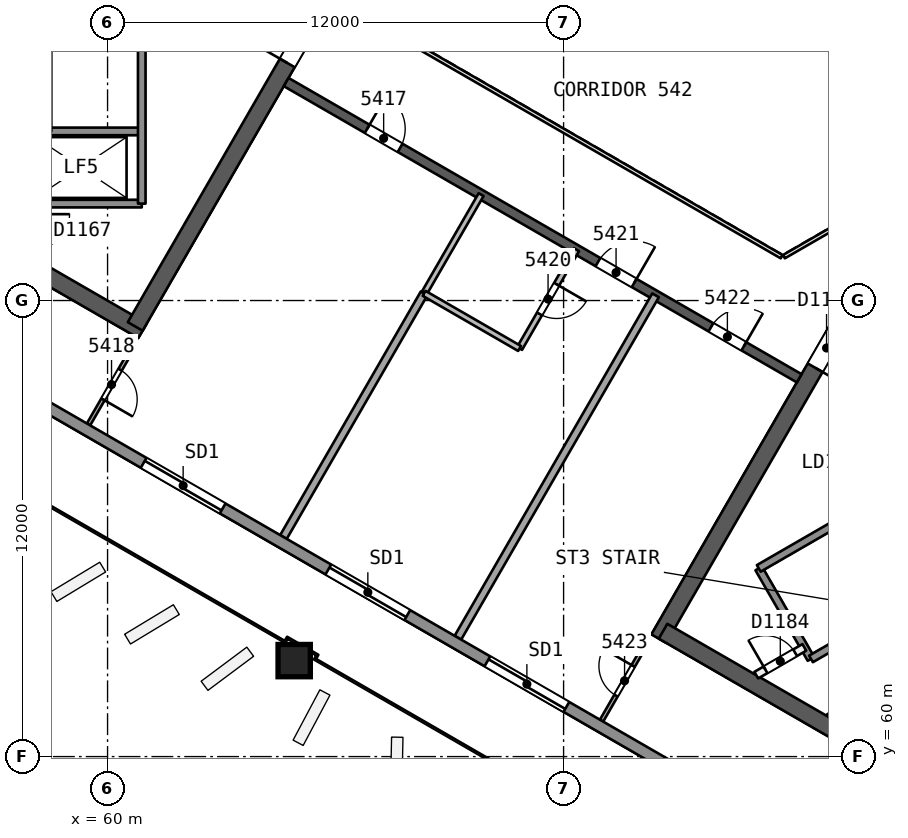
"""IFC4 building model, lengths in metres.
Left out: names, types, materials, properties, quantities, classifications, styles, units other than length and angle.
Written with IfcOpenShell. Run it as: python <this file> out.ifc"""

import sys

from ifc_helpers import new_model, si_unit, direction, frame, frame_2d, origin, origin_2d, place, context, subcontext, project, spatial, rectangle, extrude, element, fill, save


model = new_model("IFC4")
c1 = context("Model", 3, precision=1e-05, world=origin(), true_north=direction((0.0, 1.0)))
c2 = subcontext(c1, "Body", "Model", "MODEL_VIEW")
j1 = project(units=[si_unit("LENGTHUNIT", "METRE"), si_unit("PLANEANGLEUNIT", "RADIAN")], contexts=[c1])
p1 = place(None, origin())
s1 = spatial("IfcSite", under=j1, at=p1, CompositionType="ELEMENT")
p2 = place(p1, origin())
s2 = spatial("IfcBuilding", under=s1, at=p2, CompositionType="ELEMENT")
p3 = place(p2, frame((0.0, 0.0, 220.6)))
s3 = spatial("IfcBuildingStorey", under=s2, at=p3, CompositionType="ELEMENT", Elevation=220.6)
p4 = place(p3, frame((48.622, 78.307, 0.0), z_axis=(0.0, 0.0, 1.0), x_axis=(0.86602701116, -0.499997215934, 0.0)))
e1 = element("IfcWall", 1, at=p4, inside=s3, PredefinedType="SHEAR", context=c2, shape_type="SweptSolid", body=[
    extrude(rectangle(XDim=14.204, YDim=0.45, at=frame_2d((7.102, 0.0))), origin(), (0.0, 0.0, 1.0), 3.7),
])
p5 = place(p3, frame((60.728, 71.318, 0.0), z_axis=(0.0, 0.0, 1.0), x_axis=(0.500012416173, 0.866018235185, 0.0)))
e2 = element("IfcWall", 2, at=p5, inside=s3, PredefinedType="SHEAR", context=c2, shape_type="SweptSolid", body=[
    extrude(rectangle(XDim=10.155, YDim=0.45, at=frame_2d((5.078, 0.0))), origin(), (0.0, 0.0, 1.0), 3.7),
])
p6 = place(p5, frame((8.005, 0.0, 0.0)))
e3 = element("IfcOpeningElement", 3, at=p6, cuts=e2, PredefinedType="OPENING", context=c2, shape_type="SweptSolid", body=[
    extrude(rectangle(XDim=1.2, YDim=2.1, at=frame_2d((0.6, 1.05))), frame((0.0, 0.235, 0.0), z_axis=(0.0, -1.0, 0.0), x_axis=(1.0, 0.0, 0.0)), (0.0, 0.0, 1.0), 0.471),
])
p7 = place(p3, frame((79.63, 71.981, 0.0), z_axis=(0.0, 0.0, 1.0), x_axis=(-0.500002171595, -0.86602415001, 0.0)))
e4 = element("IfcWall", 4, at=p7, inside=s3, PredefinedType="SHEAR", context=c2, shape_type="SweptSolid", body=[
    extrude(rectangle(XDim=10.25, YDim=0.45, at=frame_2d((5.125, 0.0))), origin(), (0.0, 0.0, 1.0), 3.7),
])
p8 = place(p7, frame((0.82, 0.0, 0.0)))
e5 = element("IfcOpeningElement", 5, at=p8, cuts=e4, PredefinedType="OPENING", context=c2, shape_type="SweptSolid", body=[
    extrude(rectangle(XDim=1.2, YDim=2.1, at=frame_2d((0.6, 1.05))), frame((0.0, 0.235, 0.0), z_axis=(0.0, -1.0, 0.0), x_axis=(1.0, 0.0, 0.0)), (0.0, 0.0, 1.0), 0.471),
])
p9 = place(p3, frame((74.617, 63.299, 0.0), z_axis=(0.0, 0.0, 1.0), x_axis=(0.86602594008, -0.499999071108, 0.0)))
e6 = element("IfcWall", 6, at=p9, inside=s3, PredefinedType="SHEAR", context=c2, shape_type="SweptSolid", body=[
    extrude(rectangle(XDim=14.108, YDim=0.45, at=frame_2d((7.054, 0.0))), origin(), (0.0, 0.0, 1.0), 3.7),
])
p10 = place(p3, frame((64.7, 77.748, 0.0), z_axis=(0.0, 0.0, 1.0), x_axis=(0.866026492143, -0.499998114903, 0.0)))
e7 = element("IfcWall", 7, at=p10, inside=s3, PredefinedType="SHEAR", context=c2, shape_type="SweptSolid", body=[
    extrude(rectangle(XDim=15.588, YDim=0.25, at=frame_2d((7.794, 0.0))), origin(), (0.0, 0.0, 1.0), 3.3),
])
p11 = place(p10, frame((2.462, 0.0, 0.0)))
e8 = element("IfcOpeningElement", 8, at=p11, cuts=e7, PredefinedType="OPENING", context=c2, shape_type="SweptSolid", body=[
    extrude(rectangle(XDim=1.0, YDim=2.1, at=frame_2d((0.5, 1.05))), frame((0.0, 0.135, 0.0), z_axis=(0.0, -1.0, 0.0), x_axis=(1.0, 0.0, 0.0)), (0.0, 0.0, 1.0), 0.271),
])
p12 = place(p10, frame((9.474, 0.0, 0.0)))
e9 = element("IfcOpeningElement", 9, at=p12, cuts=e7, PredefinedType="OPENING", context=c2, shape_type="SweptSolid", body=[
    extrude(rectangle(XDim=1.1, YDim=2.1, at=frame_2d((0.55, 1.05))), frame((0.0, 0.135, 0.0), z_axis=(0.0, -1.0, 0.0), x_axis=(1.0, 0.0, 0.0)), (0.0, 0.0, 1.0), 0.271),
])
p13 = place(p10, frame((12.906, 0.0, 0.0)))
e10 = element("IfcOpeningElement", 10, at=p13, cuts=e7, PredefinedType="OPENING", context=c2, shape_type="SweptSolid", body=[
    extrude(rectangle(XDim=1.0, YDim=2.1, at=frame_2d((0.5, 1.05))), frame((0.0, 0.135, 0.0), z_axis=(0.0, -1.0, 0.0), x_axis=(1.0, 0.0, 0.0)), (0.0, 0.0, 1.0), 0.271),
])
p14 = place(p3, frame((64.899, 62.505, 0.0), z_axis=(0.010093620709, 0.017482414954, 0.999796221231), x_axis=(-0.866025993948, 0.499998977805, 1.48331e-07)))
e11 = element("IfcColumn", 11, at=p14, inside=s3, PredefinedType="COLUMN", context=c2, shape_type="SweptSolid", body=[
    extrude(rectangle(XDim=0.85, YDim=0.85, at=origin_2d()), origin(), (0.0, 0.0, 1.0), 3.701),
])
p15 = place(p3, frame((60.71, 70.838, 0.0), z_axis=(0.0, 0.0, 1.0), x_axis=(-0.49995203611, -0.866053093978, 0.0)))
e12 = element("IfcWall", 12, at=p15, inside=s3, PredefinedType="PARTITIONING", context=c2, shape_type="SweptSolid", body=[
    extrude(rectangle(XDim=2.424, YDim=0.1, at=frame_2d((1.212, 0.0))), origin(), (0.0, 0.0, 1.0), 3.3),
])
p16 = place(p15, frame((0.762, 0.0, 0.0)))
e13 = element("IfcOpeningElement", 13, at=p16, cuts=e12, PredefinedType="OPENING", context=c2, shape_type="SweptSolid", body=[
    extrude(rectangle(XDim=0.9, YDim=2.1, at=frame_2d((0.45, 1.05))), frame((0.0, 0.061, 0.0), z_axis=(0.0, -1.0, 0.0), x_axis=(1.0, 0.0, 0.0)), (0.0, 0.0, 1.0), 0.121),
])
p17 = place(p3, frame((64.628, 65.777, 0.0), z_axis=(0.0, 0.0, 1.0), x_axis=(0.500019340035, 0.866014237522, 0.0)))
e14 = element("IfcWall", 14, at=p17, inside=s3, PredefinedType="PARTITIONING", context=c2, shape_type="SweptSolid", body=[
    extrude(rectangle(XDim=7.403, YDim=0.2, at=frame_2d((3.702, 0.0))), origin(), (0.0, 0.0, 1.0), 3.3),
])
p18 = place(p3, frame((68.33, 72.188, 0.0), z_axis=(0.0, 0.0, 1.0), x_axis=(0.499990139034, 0.866031096941, 0.0)))
e15 = element("IfcWall", 15, at=p18, inside=s3, PredefinedType="PARTITIONING", context=c2, shape_type="SweptSolid", body=[
    extrude(rectangle(XDim=3.0, YDim=0.15, at=frame_2d((1.5, 0.0))), origin(), (0.0, 0.0, 1.0), 3.3),
])
p19 = place(p3, frame((72.342, 73.336, 0.0), z_axis=(0.0, 0.0, 1.0), x_axis=(-0.50002537861, -0.866010750942, 0.0)))
e16 = element("IfcWall", 16, at=p19, inside=s3, PredefinedType="PARTITIONING", context=c2, shape_type="SweptSolid", body=[
    extrude(rectangle(XDim=3.0, YDim=0.15, at=frame_2d((1.5, 0.0))), origin(), (0.0, 0.0, 1.0), 3.3),
])
p20 = place(p19, frame((1.05, 0.0, 0.0)))
e17 = element("IfcOpeningElement", 17, at=p20, cuts=e16, PredefinedType="OPENING", context=c2, shape_type="SweptSolid", body=[
    extrude(rectangle(XDim=0.9, YDim=2.1, at=frame_2d((0.45, 1.05))), frame((0.0, 0.085, 0.0), z_axis=(0.0, -1.0, 0.0), x_axis=(1.0, 0.0, 0.0)), (0.0, 0.0, 1.0), 0.171),
])
p21 = place(p3, frame((70.842, 70.739, 0.0), z_axis=(0.0, 0.0, 1.0), x_axis=(-0.866032775405, 0.499987231761, 0.0)))
e18 = element("IfcWall", 18, at=p21, inside=s3, PredefinedType="PARTITIONING", context=c2, shape_type="SweptSolid", body=[
    extrude(rectangle(XDim=2.9, YDim=0.15, at=frame_2d((1.45, 0.0))), origin(), (0.0, 0.0, 1.0), 3.3),
])
p22 = place(p3, frame((69.219, 63.127, 0.0), z_axis=(0.0, 0.0, 1.0), x_axis=(0.499993317952, 0.866029261632, 0.0)))
e19 = element("IfcWall", 19, at=p22, inside=s3, PredefinedType="PARTITIONING", context=c2, shape_type="SweptSolid", body=[
    extrude(rectangle(XDim=10.403, YDim=0.2, at=frame_2d((5.202, 0.0))), origin(), (0.0, 0.0, 1.0), 3.3),
])
p23 = place(p3, frame((72.999, 60.945, 0.0), z_axis=(0.0, 0.0, 1.0), x_axis=(0.49995203611, 0.866053093978, 0.0)))
e20 = element("IfcWall", 20, at=p23, inside=s3, PredefinedType="PARTITIONING", context=c2, shape_type="SweptSolid", body=[
    extrude(rectangle(XDim=2.424, YDim=0.1, at=frame_2d((1.212, 0.0))), origin(), (0.0, 0.0, 1.0), 3.3),
])
p24 = place(p23, frame((0.762, 0.0, 0.0)))
e21 = element("IfcOpeningElement", 21, at=p24, cuts=e20, PredefinedType="OPENING", context=c2, shape_type="SweptSolid", body=[
    extrude(rectangle(XDim=0.9, YDim=2.1, at=frame_2d((0.45, 1.05))), frame((0.0, 0.061, 0.0), z_axis=(0.0, -1.0, 0.0), x_axis=(1.0, 0.0, 0.0)), (0.0, 0.0, 1.0), 0.121),
])
p25 = place(p3, frame((88.155, 52.022, 0.0), z_axis=(0.0, 0.0, 1.0), x_axis=(-0.866024521231, 0.500001528624, 0.0)))
e22 = element("IfcWall", 22, at=p25, inside=s3, PredefinedType="SOLIDWALL", context=c2, shape_type="SweptSolid", body=[
    extrude(rectangle(XDim=50.762, YDim=0.3, at=frame_2d((25.381, 0.0))), origin(), (0.0, 0.0, 1.0), 3.3),
])
p26 = place(p25, frame((23.402, 0.0, 0.0)))
e23 = element("IfcOpeningElement", 23, at=p26, cuts=e22, PredefinedType="OPENING", context=c2, shape_type="SweptSolid", body=[
    extrude(rectangle(XDim=2.4, YDim=2.4, at=frame_2d((1.2, 1.2))), frame((0.0, 0.161, 0.0), z_axis=(0.0, -1.0, 0.0), x_axis=(1.0, 0.0, 0.0)), (0.0, 0.0, 1.0), 0.321),
])
p27 = place(p25, frame((29.013, 0.0, 0.0)))
e24 = element("IfcOpeningElement", 24, at=p27, cuts=e22, PredefinedType="OPENING", context=c2, shape_type="SweptSolid", body=[
    extrude(rectangle(XDim=2.4, YDim=2.4, at=frame_2d((1.2, 1.2))), frame((0.0, 0.161, 0.0), z_axis=(0.0, -1.0, 0.0), x_axis=(1.0, 0.0, 0.0)), (0.0, 0.0, 1.0), 0.321),
])
p28 = place(p25, frame((39.492, 0.0, 0.0)))
e25 = element("IfcOpeningElement", 25, at=p28, cuts=e22, PredefinedType="OPENING", context=c2, shape_type="SweptSolid", body=[
    extrude(rectangle(XDim=2.4, YDim=2.4, at=frame_2d((1.2, 1.2))), frame((0.0, 0.161, 0.0), z_axis=(0.0, -1.0, 0.0), x_axis=(1.0, 0.0, 0.0)), (0.0, 0.0, 1.0), 0.321),
])
p29 = place(p25, frame((18.569, 0.0, 0.0)))
e26 = element("IfcOpeningElement", 26, at=p29, cuts=e22, PredefinedType="OPENING", context=c2, shape_type="SweptSolid", body=[
    extrude(rectangle(XDim=2.4, YDim=2.4, at=frame_2d((1.2, 1.2))), frame((0.0, 0.161, 0.0), z_axis=(0.0, -1.0, 0.0), x_axis=(1.0, 0.0, 0.0)), (0.0, 0.0, 1.0), 0.321),
])
p30 = place(p25, frame((8.878, 0.0, 0.0)))
e27 = element("IfcOpeningElement", 27, at=p30, cuts=e22, PredefinedType="OPENING", context=c2, shape_type="SweptSolid", body=[
    extrude(rectangle(XDim=2.4, YDim=2.4, at=frame_2d((1.2, 1.2))), frame((0.0, 0.161, 0.0), z_axis=(0.0, -1.0, 0.0), x_axis=(1.0, 0.0, 0.0)), (0.0, 0.0, 1.0), 0.321),
])
for number, where, z_axis, x_axis in (
    (28, (60.9, 76.45, 0.0), (0.0, 0.0, 1.0), (-1.0, 0.0, 0.0)),
    (29, (60.9, 74.55, 0.0), (0.0, 0.0, 1.0), (-1.0, 0.0, 0.0)),
):
    element("IfcWall", number, at=place(p3, frame(where, z_axis=z_axis, x_axis=x_axis)), inside=s3, PredefinedType="SOLIDWALL", context=c2, shape_type="SweptSolid", body=[
        extrude(rectangle(XDim=3.05, YDim=0.2, at=frame_2d((1.525, 0.0))), origin(), (0.0, 0.0, 1.0), 3.3),
    ])
p31 = place(p3, frame((60.9, 85.45, 0.0), z_axis=(0.0, 0.0, 1.0), x_axis=(0.0, -1.0, 0.0)))
e30 = element("IfcWall", 30, at=p31, inside=s3, PredefinedType="SOLIDWALL", context=c2, shape_type="SweptSolid", body=[
    extrude(rectangle(XDim=10.9, YDim=0.2, at=frame_2d((5.45, 0.0))), origin(), (0.0, 0.0, 1.0), 3.3),
])
p32 = place(p31, frame((4.0, 0.0, 0.0)))
e31 = element("IfcOpeningElement", 31, at=p32, cuts=e30, PredefinedType="OPENING", context=c2, shape_type="SweptSolid", body=[
    extrude(rectangle(XDim=1.0, YDim=2.1, at=frame_2d((0.5, 1.05))), frame((0.0, 0.11, 0.0), z_axis=(0.0, -1.0, 0.0), x_axis=(1.0, 0.0, 0.0)), (0.0, 0.0, 1.0), 0.221),
])
p33 = place(p3, frame((77.135, 64.952, 0.0), z_axis=(0.0, 0.0, 1.0), x_axis=(0.499996545922, -0.866027397988, 0.0)))
e32 = element("IfcWall", 32, at=p33, inside=s3, PredefinedType="SOLIDWALL", context=c2, shape_type="SweptSolid", body=[
    extrude(rectangle(XDim=2.75, YDim=0.2, at=frame_2d((1.375, 0.0))), origin(), (0.0, 0.0, 1.0), 3.3),
])
p34 = place(p3, frame((77.135, 64.952, 0.0), z_axis=(0.0, 0.0, 1.0), x_axis=(0.866031916153, 0.499988720078, 0.0)))
e33 = element("IfcWall", 33, at=p34, inside=s3, PredefinedType="SOLIDWALL", context=c2, shape_type="SweptSolid", body=[
    extrude(rectangle(XDim=11.35, YDim=0.2, at=frame_2d((5.675, 0.0))), origin(), (0.0, 0.0, 1.0), 3.3),
])
p35 = place(p34, frame((2.875, 0.0, 0.0)))
e34 = element("IfcOpeningElement", 34, at=p35, cuts=e33, PredefinedType="OPENING", context=c2, shape_type="SweptSolid", body=[
    extrude(rectangle(XDim=1.1, YDim=2.1, at=frame_2d((0.55, 1.05))), frame((0.0, 0.11, 0.0), z_axis=(0.0, -1.0, 0.0), x_axis=(1.0, 0.0, 0.0)), (0.0, 0.0, 1.0), 0.221),
])
p36 = place(p34, frame((5.125, 0.0, 0.0)))
e35 = element("IfcOpeningElement", 35, at=p36, cuts=e33, PredefinedType="OPENING", context=c2, shape_type="SweptSolid", body=[
    extrude(rectangle(XDim=1.1, YDim=2.1, at=frame_2d((0.55, 1.05))), frame((0.0, 0.11, 0.0), z_axis=(0.0, -1.0, 0.0), x_axis=(1.0, 0.0, 0.0)), (0.0, 0.0, 1.0), 0.221),
])
p37 = place(p34, frame((7.375, 0.0, 0.0)))
e36 = element("IfcOpeningElement", 36, at=p37, cuts=e33, PredefinedType="OPENING", context=c2, shape_type="SweptSolid", body=[
    extrude(rectangle(XDim=1.1, YDim=2.1, at=frame_2d((0.55, 1.05))), frame((0.0, 0.11, 0.0), z_axis=(0.0, -1.0, 0.0), x_axis=(1.0, 0.0, 0.0)), (0.0, 0.0, 1.0), 0.221),
])
p38 = place(p3, frame((77.07, 62.143, 0.0), z_axis=(0.0, 0.0, 1.0), x_axis=(0.866013036001, 0.500021421018, 0.0)))
e37 = element("IfcWall", 37, at=p38, inside=s3, PredefinedType="PARTITIONING", context=c2, shape_type="SweptSolid", body=[
    extrude(rectangle(XDim=1.461, YDim=0.2, at=frame_2d((0.73, 0.0))), origin(), (0.0, 0.0, 1.0), 3.3),
])
p39 = place(p38, frame((0.281, 0.0, 0.0)))
e38 = element("IfcOpeningElement", 38, at=p39, cuts=e37, PredefinedType="OPENING", context=c2, shape_type="SweptSolid", body=[
    extrude(rectangle(XDim=0.9, YDim=2.1, at=frame_2d((0.45, 1.05))), frame((0.0, 0.11, 0.0), z_axis=(0.0, -1.0, 0.0), x_axis=(1.0, 0.0, 0.0)), (0.0, 0.0, 1.0), 0.221),
])
p40 = place(p3, frame((78.51, 62.57, 0.0), z_axis=(0.0, 0.0, 1.0), x_axis=(0.866053019151, 0.499952165731, 0.0)))
e39 = element("IfcWall", 39, at=p40, inside=s3, PredefinedType="SOLIDWALL", context=c2, shape_type="SweptSolid", body=[
    extrude(rectangle(XDim=2.3, YDim=0.2, at=frame_2d((1.15, 0.0))), origin(), (0.0, 0.0, 1.0), 3.3),
])
p41 = place(p3, frame((78.97, 61.046, 0.0), z_axis=(0.0, 0.0, 1.0), x_axis=(0.866033475577, 0.499986018985, 0.0)))
e40 = element("IfcWall", 40, at=p41, inside=s3, PredefinedType="PARTITIONING", context=c2, shape_type="SweptSolid", body=[
    extrude(rectangle(XDim=2.539, YDim=0.15, at=frame_2d((1.27, 0.0))), origin(), (0.0, 0.0, 1.0), 3.3),
])
p42 = place(p3, frame((67.702, 78.948, 0.0), z_axis=(0.0, 0.0, 1.0), x_axis=(0.866026658274, -0.499997827154, 0.0)))
e41 = element("IfcWall", 41, at=p42, inside=s3, PredefinedType="PARTITIONING", context=c2, shape_type="SweptSolid", body=[
    extrude(rectangle(XDim=11.588, YDim=0.1, at=frame_2d((5.794, 0.0))), origin(), (0.0, 0.0, 1.0), 3.3),
])
p43 = place(p3, frame((77.798, 73.154, 0.0), z_axis=(0.0, 0.0, 1.0), x_axis=(0.866041268327, 0.499972520799, 0.0)))
e42 = element("IfcWall", 42, at=p43, inside=s3, PredefinedType="PARTITIONING", context=c2, shape_type="SweptSolid", body=[
    extrude(rectangle(XDim=2.0, YDim=0.1, at=frame_2d((1.0, 0.0))), origin(), (0.0, 0.0, 1.0), 3.3),
])
p44 = place(p11, origin())
e43 = element("IfcDoor", 43, at=p44, inside=s3, OperationType="SINGLE_SWING_LEFT", PredefinedType="NOTDEFINED", context=c2, shape_type="SweptSolid", body=[
    extrude(rectangle(XDim=1.0, YDim=2.1, at=frame_2d((0.5, 1.05))), frame((0.0, 0.025, 0.0), z_axis=(0.0, -1.0, 0.0), x_axis=(1.0, 0.0, 0.0)), (0.0, 0.0, 1.0), 0.05),
])
fill(e8, e43)
p45 = place(p16, origin())
e44 = element("IfcDoor", 44, at=p45, inside=s3, OperationType="SINGLE_SWING_RIGHT", PredefinedType="NOTDEFINED", context=c2, shape_type="SweptSolid", body=[
    extrude(rectangle(XDim=0.9, YDim=2.1, at=frame_2d((0.45, 1.05))), frame((0.0, 0.025, 0.0), z_axis=(0.0, -1.0, 0.0), x_axis=(1.0, 0.0, 0.0)), (0.0, 0.0, 1.0), 0.05),
])
fill(e13, e44)
p46 = place(p20, origin())
e45 = element("IfcDoor", 45, at=p46, inside=s3, OperationType="SINGLE_SWING_LEFT", PredefinedType="NOTDEFINED", context=c2, shape_type="SweptSolid", body=[
    extrude(rectangle(XDim=0.9, YDim=2.1, at=frame_2d((0.45, 1.05))), frame((0.0, 0.025, 0.0), z_axis=(0.0, -1.0, 0.0), x_axis=(1.0, 0.0, 0.0)), (0.0, 0.0, 1.0), 0.05),
])
fill(e17, e45)
p47 = place(p12, origin())
e46 = element("IfcDoor", 46, at=p47, inside=s3, OperationType="SINGLE_SWING_RIGHT", PredefinedType="NOTDEFINED", context=c2, shape_type="SweptSolid", body=[
    extrude(rectangle(XDim=1.1, YDim=2.1, at=frame_2d((0.55, 1.05))), frame((0.0, 0.025, 0.0), z_axis=(0.0, -1.0, 0.0), x_axis=(1.0, 0.0, 0.0)), (0.0, 0.0, 1.0), 0.05),
])
fill(e9, e46)
p48 = place(p13, origin())
e47 = element("IfcDoor", 47, at=p48, inside=s3, OperationType="SINGLE_SWING_RIGHT", PredefinedType="NOTDEFINED", context=c2, shape_type="SweptSolid", body=[
    extrude(rectangle(XDim=1.0, YDim=2.1, at=frame_2d((0.5, 1.05))), frame((0.0, 0.025, 0.0), z_axis=(0.0, -1.0, 0.0), x_axis=(1.0, 0.0, 0.0)), (0.0, 0.0, 1.0), 0.05),
])
fill(e10, e47)
p49 = place(p24, origin())
e48 = element("IfcDoor", 48, at=p49, inside=s3, OperationType="SINGLE_SWING_RIGHT", PredefinedType="NOTDEFINED", context=c2, shape_type="SweptSolid", body=[
    extrude(rectangle(XDim=0.9, YDim=2.1, at=frame_2d((0.45, 1.05))), frame((0.0, 0.025, 0.0), z_axis=(0.0, -1.0, 0.0), x_axis=(1.0, 0.0, 0.0)), (0.0, 0.0, 1.0), 0.05),
])
fill(e21, e48)
p50 = place(p26, origin())
e49 = element("IfcDoor", 49, at=p50, inside=s3, OperationType="SLIDING_TO_LEFT", PredefinedType="NOTDEFINED", context=c2, shape_type="SweptSolid", body=[
    extrude(rectangle(XDim=2.4, YDim=2.4, at=frame_2d((1.2, 1.2))), frame((0.0, 0.025, 0.0), z_axis=(0.0, -1.0, 0.0), x_axis=(1.0, 0.0, 0.0)), (0.0, 0.0, 1.0), 0.05),
])
fill(e23, e49)
p51 = place(p27, origin())
e50 = element("IfcDoor", 50, at=p51, inside=s3, OperationType="SLIDING_TO_RIGHT", PredefinedType="NOTDEFINED", context=c2, shape_type="SweptSolid", body=[
    extrude(rectangle(XDim=2.4, YDim=2.4, at=frame_2d((1.2, 1.2))), frame((0.0, 0.025, 0.0), z_axis=(0.0, -1.0, 0.0), x_axis=(1.0, 0.0, 0.0)), (0.0, 0.0, 1.0), 0.05),
])
fill(e24, e50)
p52 = place(p29, origin())
e51 = element("IfcDoor", 51, at=p52, inside=s3, OperationType="SLIDING_TO_RIGHT", PredefinedType="NOTDEFINED", context=c2, shape_type="SweptSolid", body=[
    extrude(rectangle(XDim=2.4, YDim=2.4, at=frame_2d((1.2, 1.2))), frame((0.0, 0.025, 0.0), z_axis=(0.0, -1.0, 0.0), x_axis=(1.0, 0.0, 0.0)), (0.0, 0.0, 1.0), 0.05),
])
fill(e26, e51)
p53 = place(p6, origin())
e52 = element("IfcDoor", 52, at=p53, inside=s3, OperationType="SINGLE_SWING_LEFT", PredefinedType="NOTDEFINED", context=c2, shape_type="SweptSolid", body=[
    extrude(rectangle(XDim=1.2, YDim=2.1, at=frame_2d((0.6, 1.05))), frame((0.0, 0.025, 0.0), z_axis=(0.0, -1.0, 0.0), x_axis=(1.0, 0.0, 0.0)), (0.0, 0.0, 1.0), 0.05),
])
fill(e3, e52)
p54 = place(p8, origin())
e53 = element("IfcDoor", 53, at=p54, inside=s3, OperationType="SINGLE_SWING_RIGHT", PredefinedType="NOTDEFINED", context=c2, shape_type="SweptSolid", body=[
    extrude(rectangle(XDim=1.2, YDim=2.1, at=frame_2d((0.6, 1.05))), frame((0.0, 0.025, 0.0), z_axis=(0.0, -1.0, 0.0), x_axis=(1.0, 0.0, 0.0)), (0.0, 0.0, 1.0), 0.05),
])
fill(e5, e53)
p55 = place(p39, origin())
e54 = element("IfcDoor", 54, at=p55, inside=s3, OperationType="SINGLE_SWING_LEFT", PredefinedType="NOTDEFINED", context=c2, shape_type="SweptSolid", body=[
    extrude(rectangle(XDim=0.9, YDim=2.1, at=frame_2d((0.45, 1.05))), frame((0.0, 0.025, 0.0), z_axis=(0.0, -1.0, 0.0), x_axis=(1.0, 0.0, 0.0)), (0.0, 0.0, 1.0), 0.05),
])
fill(e38, e54)
save(model, sys.argv[1])
